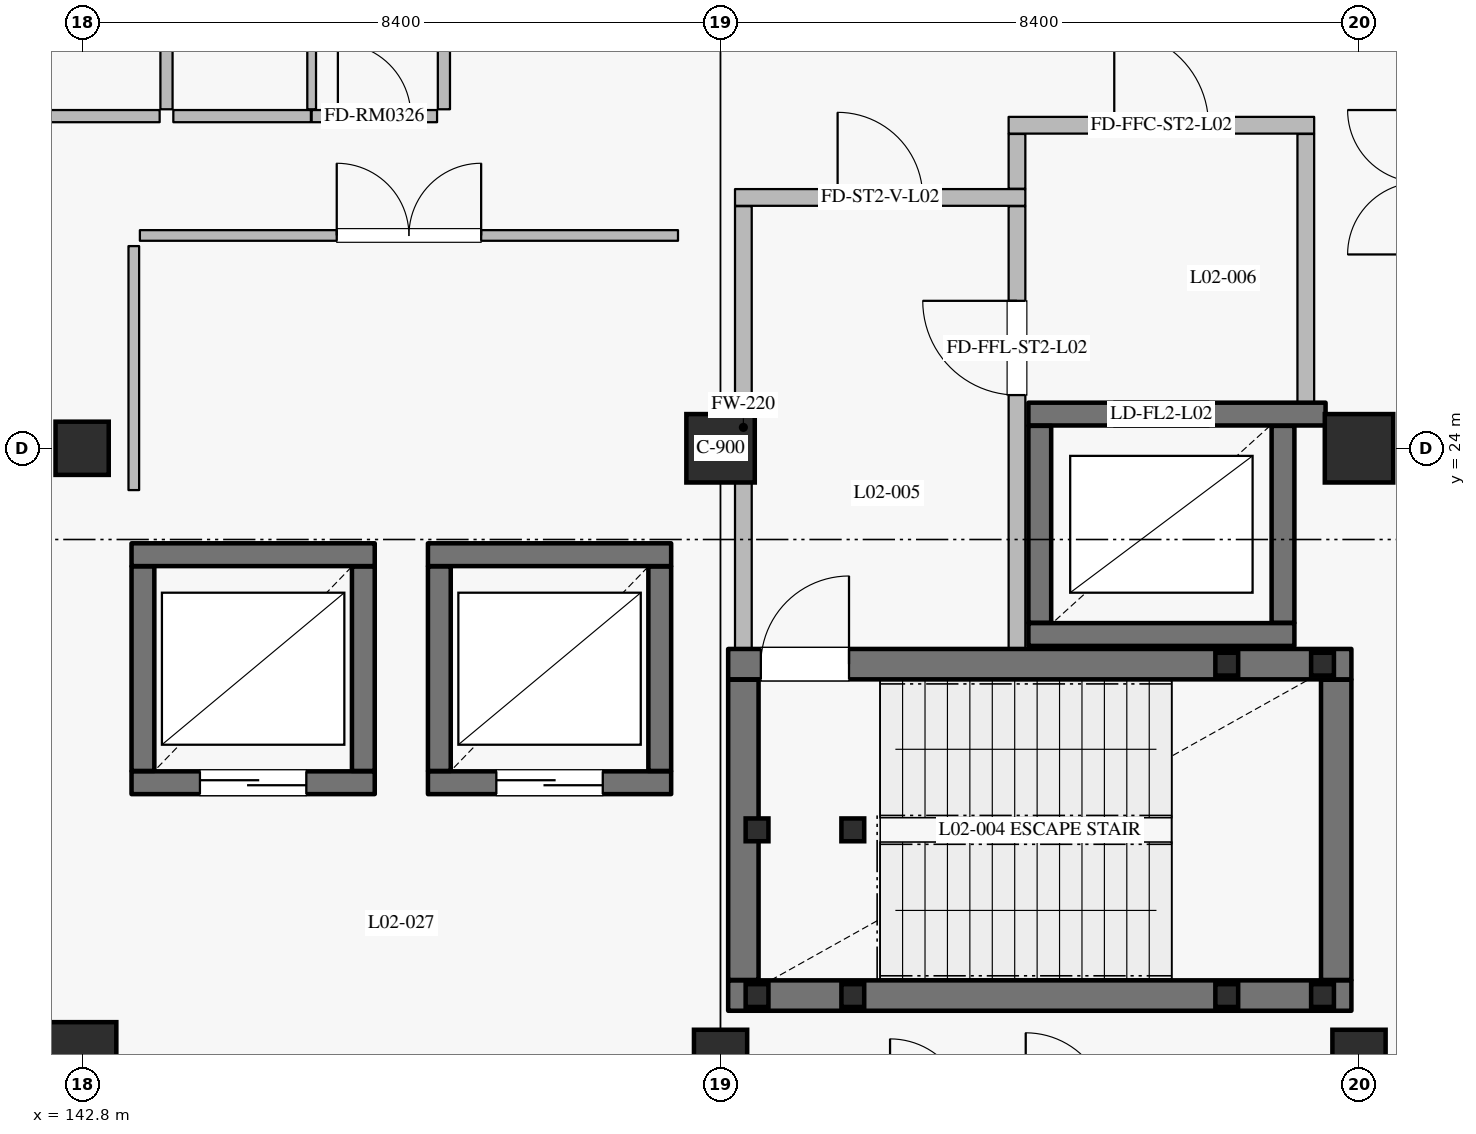
"""IFC4 building model, lengths in metres.
Left out: names, types, materials, properties, quantities, classifications, styles, units other than length and angle.
Written with IfcOpenShell. Run it as: python <this file> out.ifc"""

import sys

from ifc_helpers import new_model, si_unit, direction, frame, frame_2d, origin, origin_2d, place, context, subcontext, project, spatial, rectangle, hollow_rectangle, extrude, element, fill, save


model = new_model("IFC4")
c1 = context("Model", 3, precision=1e-05, world=origin(), true_north=direction((0.0, 1.0)))
c2 = subcontext(c1, "Body", "Model", "MODEL_VIEW")
j1 = project(units=[si_unit("LENGTHUNIT", "METRE"), si_unit("PLANEANGLEUNIT", "RADIAN")], contexts=[c1])
p1 = place(None, origin())
s1 = spatial("IfcSite", under=j1, at=p1, CompositionType="ELEMENT")
p2 = place(p1, origin())
s2 = spatial("IfcBuilding", under=s1, at=p2, CompositionType="ELEMENT")
p3 = place(p2, frame((0.0, 0.0, 11.4)))
s3 = spatial("IfcBuildingStorey", under=s2, at=p3, CompositionType="ELEMENT", Elevation=11.4)
for number, where, z_axis, x_axis in (
    (1, (142.8, 16.0, 0.0), (0.0, 0.0, 1.0), (1.0, 0.0, 0.0)),
    (2, (151.2, 24.0, 0.0), (0.0, 0.0, 1.0), (1.0, 0.0, 0.0)),
    (3, (159.6, 24.0, 0.0), (0.0, 0.0, 1.0), (1.0, 0.0, 0.0)),
):
    element("IfcColumn", number, at=place(p3, frame(where, z_axis=z_axis, x_axis=x_axis)), inside=s3, PredefinedType="COLUMN", context=c2, shape_type="SweptSolid", body=[
        extrude(rectangle(XDim=0.9, YDim=0.9, at=origin_2d()), origin(), (0.0, 0.0, 1.0), 4.8),
    ])
for number, where, z_axis, x_axis in (
    (4, (142.8, 24.0, 0.0), (0.0, 0.0, 1.0), (1.0, 0.0, 0.0)),
    (5, (151.2, 16.0, 0.0), (0.0, 0.0, 1.0), (1.0, 0.0, 0.0)),
    (6, (159.6, 16.0, 0.0), (0.0, 0.0, 1.0), (1.0, 0.0, 0.0)),
):
    element("IfcColumn", number, at=place(p3, frame(where, z_axis=z_axis, x_axis=x_axis)), inside=s3, PredefinedType="COLUMN", context=c2, shape_type="SweptSolid", body=[
        extrude(rectangle(XDim=0.7, YDim=0.7, at=origin_2d()), origin(), (0.0, 0.0, 1.0), 4.8),
    ])
p4 = place(p3, frame((155.25, 21.55, 0.0), z_axis=(0.0, 0.0, 1.0), x_axis=(1.0, 0.0, 0.0)))
e7 = element("IfcWall", 7, at=p4, inside=s3, PredefinedType="SHEAR", context=c2, shape_type="SweptSolid", body=[
    extrude(rectangle(XDim=3.5, YDim=0.3, at=frame_2d((1.75, 0.0))), origin(), (0.0, 0.0, 1.0), 4.535),
])
p5 = place(p3, frame((158.6, 21.705, 0.0), z_axis=(0.0, 0.0, 1.0), x_axis=(0.0, 1.0, 0.0)))
e8 = element("IfcWall", 8, at=p5, inside=s3, PredefinedType="SHEAR", context=c2, shape_type="SweptSolid", body=[
    extrude(rectangle(XDim=2.59, YDim=0.3, at=frame_2d((1.295, 0.0))), origin(), (0.0, 0.0, 1.0), 4.535),
])
p6 = place(p3, frame((159.16, 24.45, 0.0), z_axis=(0.0, 0.0, 1.0), x_axis=(-1.0, 0.0, 0.0)))
e9 = element("IfcWall", 9, at=p6, inside=s3, PredefinedType="SHEAR", context=c2, shape_type="SweptSolid", body=[
    extrude(rectangle(XDim=3.91, YDim=0.3, at=frame_2d((1.955, 0.0))), origin(), (0.0, 0.0, 1.0), 4.535),
])
p7 = place(p6, frame((1.535, 0.0, 0.0)))
e10 = element("IfcOpeningElement", 10, at=p7, cuts=e9, PredefinedType="OPENING", context=c2, shape_type="SweptSolid", body=[
    extrude(rectangle(XDim=1.25, YDim=2.25, at=frame_2d((0.625, 1.125))), frame((0.0, 0.16, 0.0), z_axis=(0.0, -1.0, 0.0), x_axis=(1.0, 0.0, 0.0)), (0.0, 0.0, 1.0), 0.32),
])
p8 = place(p3, frame((155.4, 24.295, 0.0), z_axis=(0.0, 0.0, 1.0), x_axis=(0.0, -1.0, 0.0)))
e11 = element("IfcWall", 11, at=p8, inside=s3, PredefinedType="SHEAR", context=c2, shape_type="SweptSolid", body=[
    extrude(rectangle(XDim=2.59, YDim=0.3, at=frame_2d((1.295, 0.0))), origin(), (0.0, 0.0, 1.0), 4.535),
])
p9 = place(p3, frame((143.45, 19.6, 0.0), z_axis=(0.0, 0.0, 1.0), x_axis=(1.0, 0.0, 0.0)))
e12 = element("IfcWall", 12, at=p9, inside=s3, PredefinedType="SHEAR", context=c2, shape_type="SweptSolid", body=[
    extrude(rectangle(XDim=3.2, YDim=0.3, at=frame_2d((1.6, 0.0))), origin(), (0.0, 0.0, 1.0), 4.535),
])
p10 = place(p9, frame((0.9, 0.0, 0.0)))
e13 = element("IfcOpeningElement", 13, at=p10, cuts=e12, PredefinedType="OPENING", context=c2, shape_type="SweptSolid", body=[
    extrude(rectangle(XDim=1.4, YDim=2.35, at=frame_2d((0.7, 1.175))), frame((0.0, 0.16, 0.0), z_axis=(0.0, -1.0, 0.0), x_axis=(1.0, 0.0, 0.0)), (0.0, 0.0, 1.0), 0.32),
])
p11 = place(p3, frame((146.5, 19.755, 0.0), z_axis=(0.0, 0.0, 1.0), x_axis=(0.0, 1.0, 0.0)))
e14 = element("IfcWall", 14, at=p11, inside=s3, PredefinedType="SHEAR", context=c2, shape_type="SweptSolid", body=[
    extrude(rectangle(XDim=2.69, YDim=0.3, at=frame_2d((1.345, 0.0))), origin(), (0.0, 0.0, 1.0), 4.535),
])
p12 = place(p3, frame((146.65, 22.6, 0.0), z_axis=(0.0, 0.0, 1.0), x_axis=(-1.0, 0.0, 0.0)))
e15 = element("IfcWall", 15, at=p12, inside=s3, PredefinedType="SHEAR", context=c2, shape_type="SweptSolid", body=[
    extrude(rectangle(XDim=3.2, YDim=0.3, at=frame_2d((1.6, 0.0))), origin(), (0.0, 0.0, 1.0), 4.535),
])
p13 = place(p3, frame((143.6, 22.445, 0.0), z_axis=(0.0, 0.0, 1.0), x_axis=(0.0, -1.0, 0.0)))
e16 = element("IfcWall", 16, at=p13, inside=s3, PredefinedType="SHEAR", context=c2, shape_type="SweptSolid", body=[
    extrude(rectangle(XDim=2.69, YDim=0.3, at=frame_2d((1.345, 0.0))), origin(), (0.0, 0.0, 1.0), 4.535),
])
p14 = place(p3, frame((147.35, 19.6, 0.0), z_axis=(0.0, 0.0, 1.0), x_axis=(1.0, 0.0, 0.0)))
e17 = element("IfcWall", 17, at=p14, inside=s3, PredefinedType="SHEAR", context=c2, shape_type="SweptSolid", body=[
    extrude(rectangle(XDim=3.2, YDim=0.3, at=frame_2d((1.6, 0.0))), origin(), (0.0, 0.0, 1.0), 4.535),
])
p15 = place(p14, frame((0.9, 0.0, 0.0)))
e18 = element("IfcOpeningElement", 18, at=p15, cuts=e17, PredefinedType="OPENING", context=c2, shape_type="SweptSolid", body=[
    extrude(rectangle(XDim=1.4, YDim=2.35, at=frame_2d((0.7, 1.175))), frame((0.0, 0.16, 0.0), z_axis=(0.0, -1.0, 0.0), x_axis=(1.0, 0.0, 0.0)), (0.0, 0.0, 1.0), 0.32),
])
p16 = place(p3, frame((150.4, 19.755, 0.0), z_axis=(0.0, 0.0, 1.0), x_axis=(0.0, 1.0, 0.0)))
e19 = element("IfcWall", 19, at=p16, inside=s3, PredefinedType="SHEAR", context=c2, shape_type="SweptSolid", body=[
    extrude(rectangle(XDim=2.69, YDim=0.3, at=frame_2d((1.345, 0.0))), origin(), (0.0, 0.0, 1.0), 4.535),
])
p17 = place(p3, frame((150.55, 22.6, 0.0), z_axis=(0.0, 0.0, 1.0), x_axis=(-1.0, 0.0, 0.0)))
e20 = element("IfcWall", 20, at=p17, inside=s3, PredefinedType="SHEAR", context=c2, shape_type="SweptSolid", body=[
    extrude(rectangle(XDim=3.2, YDim=0.3, at=frame_2d((1.6, 0.0))), origin(), (0.0, 0.0, 1.0), 4.535),
])
p18 = place(p3, frame((147.5, 22.445, 0.0), z_axis=(0.0, 0.0, 1.0), x_axis=(0.0, -1.0, 0.0)))
e21 = element("IfcWall", 21, at=p18, inside=s3, PredefinedType="SHEAR", context=c2, shape_type="SweptSolid", body=[
    extrude(rectangle(XDim=2.69, YDim=0.3, at=frame_2d((1.345, 0.0))), origin(), (0.0, 0.0, 1.0), 4.535),
])
p19 = place(p3, frame((151.3, 16.8, 0.0), z_axis=(0.0, 0.0, 1.0), x_axis=(1.0, 0.0, 0.0)))
e22 = element("IfcWall", 22, at=p19, inside=s3, PredefinedType="SHEAR", context=c2, shape_type="SweptSolid", body=[
    extrude(rectangle(XDim=8.2, YDim=0.4, at=frame_2d((4.1, 0.0))), origin(), (0.0, 0.0, 1.0), 4.535),
])
p20 = place(p3, frame((159.3, 17.005, 0.0), z_axis=(0.0, 0.0, 1.0), x_axis=(0.0, 1.0, 0.0)))
e23 = element("IfcWall", 23, at=p20, inside=s3, PredefinedType="SHEAR", context=c2, shape_type="SweptSolid", body=[
    extrude(rectangle(XDim=3.95, YDim=0.4, at=frame_2d((1.975, 0.0))), origin(), (0.0, 0.0, 1.0), 4.535),
])
p21 = place(p3, frame((151.3, 21.16, 0.0), z_axis=(0.0, 0.0, 1.0), x_axis=(1.0, 0.0, 0.0)))
e24 = element("IfcWall", 24, at=p21, inside=s3, PredefinedType="SHEAR", context=c2, shape_type="SweptSolid", body=[
    extrude(rectangle(XDim=8.2, YDim=0.4, at=frame_2d((4.1, 0.0))), origin(), (0.0, 0.0, 1.0), 4.535),
])
p22 = place(p21, frame((0.43, 0.0, 0.0)))
e25 = element("IfcOpeningElement", 25, at=p22, cuts=e24, PredefinedType="OPENING", context=c2, shape_type="SweptSolid", body=[
    extrude(rectangle(XDim=1.16, YDim=2.2, at=frame_2d((0.58, 1.1))), frame((0.0, 0.21, 0.0), z_axis=(0.0, -1.0, 0.0), x_axis=(1.0, 0.0, 0.0)), (0.0, 0.0, 1.0), 0.42),
])
p23 = place(p3, frame((151.5, 17.005, 0.0), z_axis=(0.0, 0.0, 1.0), x_axis=(0.0, 1.0, 0.0)))
e26 = element("IfcWall", 26, at=p23, inside=s3, PredefinedType="SHEAR", context=c2, shape_type="SweptSolid", body=[
    extrude(rectangle(XDim=3.95, YDim=0.4, at=frame_2d((1.975, 0.0))), origin(), (0.0, 0.0, 1.0), 4.535),
])
p24 = place(p3, frame((151.5, 21.365, 0.0), z_axis=(0.0, 0.0, 1.0), x_axis=(0.0, 1.0, 0.0)))
e27 = element("IfcWall", 27, at=p24, inside=s3, PredefinedType="PARTITIONING", context=c2, shape_type="SweptSolid", body=[
    extrude(rectangle(XDim=5.82, YDim=0.22, at=frame_2d((2.91, 0.0))), origin(), (0.0, 0.0, 1.0), 4.535),
])
p25 = place(p3, frame((151.39, 27.3, 0.0), z_axis=(0.0, 0.0, 1.0), x_axis=(1.0, 0.0, 0.0)))
e28 = element("IfcWall", 28, at=p25, inside=s3, PredefinedType="PARTITIONING", context=c2, shape_type="SweptSolid", body=[
    extrude(rectangle(XDim=3.82, YDim=0.22, at=frame_2d((1.91, 0.0))), origin(), (0.0, 0.0, 1.0), 4.535),
])
p26 = place(p25, frame((1.35, 0.0, 0.0)))
e29 = element("IfcOpeningElement", 29, at=p26, cuts=e28, PredefinedType="OPENING", context=c2, shape_type="SweptSolid", body=[
    extrude(rectangle(XDim=1.12, YDim=2.2, at=frame_2d((0.56, 1.1))), frame((0.0, 0.12, 0.0), z_axis=(0.0, -1.0, 0.0), x_axis=(1.0, 0.0, 0.0)), (0.0, 0.0, 1.0), 0.24),
])
p27 = place(p3, frame((155.1, 21.365, 0.0), z_axis=(0.0, 0.0, 1.0), x_axis=(0.0, 1.0, 0.0)))
e30 = element("IfcWall", 30, at=p27, inside=s3, PredefinedType="PARTITIONING", context=c2, shape_type="SweptSolid", body=[
    extrude(rectangle(XDim=5.82, YDim=0.22, at=frame_2d((2.91, 0.0))), origin(), (0.0, 0.0, 1.0), 4.535),
])
p28 = place(p27, frame((3.335, 0.0, 0.0)))
e31 = element("IfcOpeningElement", 31, at=p28, cuts=e30, PredefinedType="OPENING", context=c2, shape_type="SweptSolid", body=[
    extrude(rectangle(XDim=1.24, YDim=2.2, at=frame_2d((0.62, 1.1))), frame((0.0, 0.12, 0.0), z_axis=(0.0, -1.0, 0.0), x_axis=(1.0, 0.0, 0.0)), (0.0, 0.0, 1.0), 0.24),
])
p29 = place(p3, frame((155.1, 27.415, 0.0), z_axis=(0.0, 0.0, 1.0), x_axis=(0.0, 1.0, 0.0)))
e32 = element("IfcWall", 32, at=p29, inside=s3, PredefinedType="PARTITIONING", context=c2, shape_type="SweptSolid", body=[
    extrude(rectangle(XDim=0.72, YDim=0.22, at=frame_2d((0.36, 0.0))), origin(), (0.0, 0.0, 1.0), 4.535),
])
p30 = place(p3, frame((158.9, 24.605, 0.0), z_axis=(0.0, 0.0, 1.0), x_axis=(0.0, 1.0, 0.0)))
e33 = element("IfcWall", 33, at=p30, inside=s3, PredefinedType="PARTITIONING", context=c2, shape_type="SweptSolid", body=[
    extrude(rectangle(XDim=3.53, YDim=0.22, at=frame_2d((1.765, 0.0))), origin(), (0.0, 0.0, 1.0), 4.535),
])
p31 = place(p3, frame((154.99, 28.25, 0.0), z_axis=(0.0, 0.0, 1.0), x_axis=(1.0, 0.0, 0.0)))
e34 = element("IfcWall", 34, at=p31, inside=s3, PredefinedType="PARTITIONING", context=c2, shape_type="SweptSolid", body=[
    extrude(rectangle(XDim=4.02, YDim=0.22, at=frame_2d((2.01, 0.0))), origin(), (0.0, 0.0, 1.0), 4.535),
])
p32 = place(p31, frame((1.39, 0.0, 0.0)))
e35 = element("IfcOpeningElement", 35, at=p32, cuts=e34, PredefinedType="OPENING", context=c2, shape_type="SweptSolid", body=[
    extrude(rectangle(XDim=1.24, YDim=2.2, at=frame_2d((0.62, 1.1))), frame((0.0, 0.12, 0.0), z_axis=(0.0, -1.0, 0.0), x_axis=(1.0, 0.0, 0.0)), (0.0, 0.0, 1.0), 0.24),
])
for number, where, z_axis, x_axis in (
    (36, (151.68, 16.8, 0.0), (0.0, 0.0, 1.0), (1.0, 0.0, 0.0)),
    (37, (151.68, 18.98, 0.0), (0.0, 0.0, 1.0), (1.0, 0.0, 0.0)),
    (38, (152.94, 16.8, 0.0), (0.0, 0.0, 1.0), (1.0, 0.0, 0.0)),
    (39, (152.94, 18.98, 0.0), (0.0, 0.0, 1.0), (1.0, 0.0, 0.0)),
):
    element("IfcColumn", number, at=place(p3, frame(where, z_axis=z_axis, x_axis=x_axis)), inside=s3, PredefinedType="COLUMN", context=c2, shape_type="SweptSolid", body=[
        extrude(hollow_rectangle(XDim=0.3, YDim=0.3, WallThickness=0.012, at=origin_2d()), origin(), (0.0, 0.0, 1.0), 4.62),
    ])
for number, where, z_axis, x_axis in (
    (40, (157.86, 16.8, -2.7), (0.0, 0.0, 1.0), (1.0, 0.0, 0.0)),
    (41, (157.86, 21.16, -2.7), (0.0, 0.0, 1.0), (1.0, 0.0, 0.0)),
    (42, (159.12, 16.8, -2.7), (0.0, 0.0, 1.0), (1.0, 0.0, 0.0)),
    (43, (159.12, 21.16, -2.7), (0.0, 0.0, 1.0), (1.0, 0.0, 0.0)),
):
    element("IfcColumn", number, at=place(p3, frame(where, z_axis=z_axis, x_axis=x_axis)), inside=s3, PredefinedType="COLUMN", context=c2, shape_type="SweptSolid", body=[
        extrude(hollow_rectangle(XDim=0.3, YDim=0.3, WallThickness=0.012, at=origin_2d()), origin(), (0.0, 0.0, 1.0), 4.92),
    ])
for number, where, z_axis, x_axis in (
    (44, (142.01, 28.37, 0.0), (0.0, 0.0, 1.0), (1.0, 0.0, 0.0)),
    (45, (144.0, 28.37, 0.0), (0.0, 0.0, 1.0), (1.0, 0.0, 0.0)),
):
    element("IfcWall", number, at=place(p3, frame(where, z_axis=z_axis, x_axis=x_axis)), inside=s3, PredefinedType="PARTITIONING", context=c2, shape_type="SweptSolid", body=[
        extrude(rectangle(XDim=1.81, YDim=0.16, at=frame_2d((0.905, 0.0))), origin(), (0.0, 0.0, 1.0), 4.535),
    ])
p33 = place(p3, frame((145.82, 28.37, 0.0), z_axis=(0.0, 0.0, 1.0), x_axis=(1.0, 0.0, 0.0)))
e46 = element("IfcWall", 46, at=p33, inside=s3, PredefinedType="PARTITIONING", context=c2, shape_type="SweptSolid", body=[
    extrude(rectangle(XDim=1.65, YDim=0.16, at=frame_2d((0.825, 0.0))), origin(), (0.0, 0.0, 1.0), 4.535),
])
p34 = place(p33, frame((0.345, 0.0, 0.0)))
e47 = element("IfcOpeningElement", 47, at=p34, cuts=e46, PredefinedType="OPENING", context=c2, shape_type="SweptSolid", body=[
    extrude(rectangle(XDim=0.96, YDim=2.2, at=frame_2d((0.48, 1.1))), frame((0.0, 0.09, 0.0), z_axis=(0.0, -1.0, 0.0), x_axis=(1.0, 0.0, 0.0)), (0.0, 0.0, 1.0), 0.18),
])
p35 = place(p3, frame((145.82, 28.46, 0.0), z_axis=(0.0, 0.0, 1.0), x_axis=(0.0, 1.0, 0.0)))
e48 = element("IfcWall", 48, at=p35, inside=s3, PredefinedType="PARTITIONING", context=c2, shape_type="SweptSolid", body=[
    extrude(rectangle(XDim=2.45, YDim=0.115, at=frame_2d((1.225, 0.0))), origin(), (0.0, 0.0, 1.0), 4.535),
])
for number, where, z_axis, x_axis in (
    (49, (143.91, 28.46, 0.0), (0.0, 0.0, 1.0), (0.0, 1.0, 0.0)),
    (50, (147.56, 28.46, 0.0), (0.0, 0.0, 1.0), (0.0, 1.0, 0.0)),
):
    element("IfcWall", number, at=place(p3, frame(where, z_axis=z_axis, x_axis=x_axis)), inside=s3, PredefinedType="PARTITIONING", context=c2, shape_type="SweptSolid", body=[
        extrude(rectangle(XDim=4.26, YDim=0.16, at=frame_2d((2.13, 0.0))), origin(), (0.0, 0.0, 1.0), 4.535),
    ])
p36 = place(p3, frame((143.56, 26.8, 0.0), z_axis=(0.0, 0.0, 1.0), x_axis=(1.0, 0.0, 0.0)))
e51 = element("IfcWall", 51, at=p36, inside=s3, PredefinedType="PARTITIONING", context=c2, shape_type="SweptSolid", body=[
    extrude(rectangle(XDim=7.08, YDim=0.14, at=frame_2d((3.54, 0.0))), origin(), (0.0, 0.0, 1.0), 4.535),
])
p37 = place(p36, frame((2.59, 0.0, 0.0)))
e52 = element("IfcOpeningElement", 52, at=p37, cuts=e51, PredefinedType="OPENING", context=c2, shape_type="SweptSolid", body=[
    extrude(rectangle(XDim=1.9, YDim=2.4, at=frame_2d((0.95, 1.2))), frame((0.0, 0.08, 0.0), z_axis=(0.0, -1.0, 0.0), x_axis=(1.0, 0.0, 0.0)), (0.0, 0.0, 1.0), 0.16),
])
p38 = place(p3, frame((143.48, 23.45, 0.0), z_axis=(0.0, 0.0, 1.0), x_axis=(0.0, 1.0, 0.0)))
e53 = element("IfcWall", 53, at=p38, inside=s3, PredefinedType="PARTITIONING", context=c2, shape_type="SweptSolid", body=[
    extrude(rectangle(XDim=3.21, YDim=0.14, at=frame_2d((1.605, 0.0))), origin(), (0.0, 0.0, 1.0), 4.535),
])
p39 = place(p7, origin())
e54 = element("IfcDoor", 54, at=p39, inside=s3, OperationType="DOUBLE_DOOR_SLIDING", PredefinedType="DOOR", context=c2, shape_type="SweptSolid", body=[
    extrude(rectangle(XDim=1.25, YDim=2.25, at=frame_2d((0.625, 1.125))), frame((0.0, 0.025, 0.0), z_axis=(0.0, -1.0, 0.0), x_axis=(1.0, 0.0, 0.0)), (0.0, 0.0, 1.0), 0.05),
])
fill(e10, e54)
p40 = place(p10, origin())
e55 = element("IfcDoor", 55, at=p40, inside=s3, OperationType="DOUBLE_DOOR_SLIDING", PredefinedType="DOOR", context=c2, shape_type="SweptSolid", body=[
    extrude(rectangle(XDim=1.4, YDim=2.35, at=frame_2d((0.7, 1.175))), frame((0.0, 0.025, 0.0), z_axis=(0.0, -1.0, 0.0), x_axis=(1.0, 0.0, 0.0)), (0.0, 0.0, 1.0), 0.05),
])
fill(e13, e55)
p41 = place(p15, origin())
e56 = element("IfcDoor", 56, at=p41, inside=s3, OperationType="DOUBLE_DOOR_SLIDING", PredefinedType="DOOR", context=c2, shape_type="SweptSolid", body=[
    extrude(rectangle(XDim=1.4, YDim=2.35, at=frame_2d((0.7, 1.175))), frame((0.0, 0.025, 0.0), z_axis=(0.0, -1.0, 0.0), x_axis=(1.0, 0.0, 0.0)), (0.0, 0.0, 1.0), 0.05),
])
fill(e18, e56)
p42 = place(p22, origin())
e57 = element("IfcDoor", 57, at=p42, inside=s3, OperationType="SINGLE_SWING_RIGHT", PredefinedType="DOOR", context=c2, shape_type="SweptSolid", body=[
    extrude(rectangle(XDim=1.16, YDim=2.2, at=frame_2d((0.58, 1.1))), frame((0.0, 0.025, 0.0), z_axis=(0.0, -1.0, 0.0), x_axis=(1.0, 0.0, 0.0)), (0.0, 0.0, 1.0), 0.05),
])
fill(e25, e57)
p43 = place(p26, origin())
e58 = element("IfcDoor", 58, at=p43, inside=s3, OperationType="SINGLE_SWING_LEFT", PredefinedType="DOOR", context=c2, shape_type="SweptSolid", body=[
    extrude(rectangle(XDim=1.12, YDim=2.2, at=frame_2d((0.56, 1.1))), frame((0.0, 0.025, 0.0), z_axis=(0.0, -1.0, 0.0), x_axis=(1.0, 0.0, 0.0)), (0.0, 0.0, 1.0), 0.05),
])
fill(e29, e58)
p44 = place(p28, origin())
e59 = element("IfcDoor", 59, at=p44, inside=s3, OperationType="SINGLE_SWING_RIGHT", PredefinedType="DOOR", context=c2, shape_type="SweptSolid", body=[
    extrude(rectangle(XDim=1.24, YDim=2.2, at=frame_2d((0.62, 1.1))), frame((0.0, 0.025, 0.0), z_axis=(0.0, -1.0, 0.0), x_axis=(1.0, 0.0, 0.0)), (0.0, 0.0, 1.0), 0.05),
])
fill(e31, e59)
p45 = place(p32, origin())
e60 = element("IfcDoor", 60, at=p45, inside=s3, OperationType="SINGLE_SWING_LEFT", PredefinedType="DOOR", context=c2, shape_type="SweptSolid", body=[
    extrude(rectangle(XDim=1.24, YDim=2.2, at=frame_2d((0.62, 1.1))), frame((0.0, 0.025, 0.0), z_axis=(0.0, -1.0, 0.0), x_axis=(1.0, 0.0, 0.0)), (0.0, 0.0, 1.0), 0.05),
])
fill(e35, e60)
p46 = place(p34, origin())
e61 = element("IfcDoor", 61, at=p46, inside=s3, OperationType="SINGLE_SWING_LEFT", PredefinedType="DOOR", context=c2, shape_type="SweptSolid", body=[
    extrude(rectangle(XDim=0.96, YDim=2.2, at=frame_2d((0.48, 1.1))), frame((0.0, 0.025, 0.0), z_axis=(0.0, -1.0, 0.0), x_axis=(1.0, 0.0, 0.0)), (0.0, 0.0, 1.0), 0.05),
])
fill(e47, e61)
p47 = place(p37, origin())
e62 = element("IfcDoor", 62, at=p47, inside=s3, OperationType="DOUBLE_DOOR_SINGLE_SWING", PredefinedType="DOOR", context=c2, shape_type="SweptSolid", body=[
    extrude(rectangle(XDim=1.9, YDim=2.4, at=frame_2d((0.95, 1.2))), frame((0.0, 0.025, 0.0), z_axis=(0.0, -1.0, 0.0), x_axis=(1.0, 0.0, 0.0)), (0.0, 0.0, 1.0), 0.05),
])
fill(e52, e62)
save(model, sys.argv[1])
